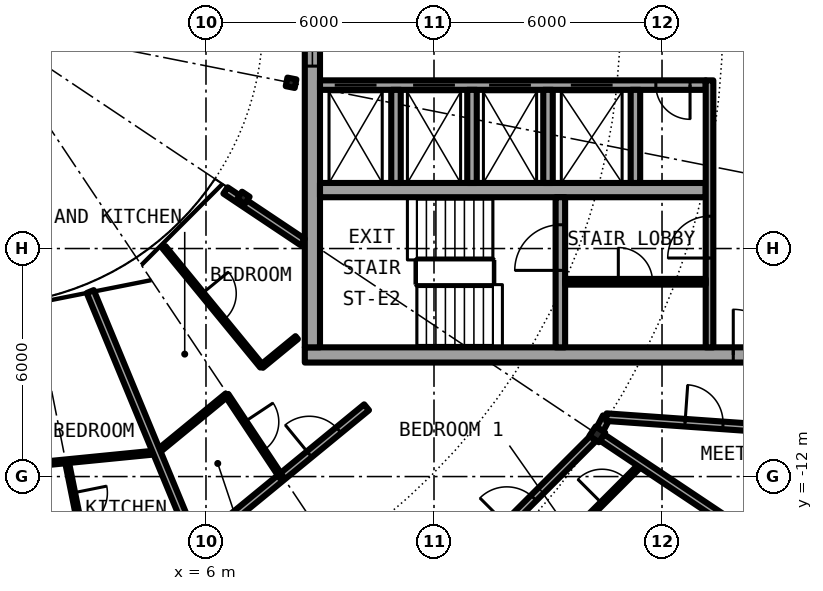
"""IFC4 building model, lengths in metres.
Left out: names, types, materials, properties, quantities, classifications, styles, units other than length and angle.
Written with IfcOpenShell. Run it as: python <this file> out.ifc"""

import sys

from ifc_helpers import new_model, si_unit, direction, frame, frame_2d, origin, origin_2d, place, context, subcontext, project, spatial, rectangle, i_section, extrude, element, fill, save


model = new_model("IFC4")
c1 = context("Model", 3, precision=1e-05, world=origin(), true_north=direction((0.0, 1.0)))
c2 = subcontext(c1, "Body", "Model", "MODEL_VIEW")
j1 = project(units=[si_unit("LENGTHUNIT", "METRE"), si_unit("PLANEANGLEUNIT", "RADIAN")], contexts=[c1])
p1 = place(None, origin())
s1 = spatial("IfcSite", under=j1, at=p1, CompositionType="ELEMENT")
p2 = place(p1, origin())
s2 = spatial("IfcBuilding", under=s1, at=p2, CompositionType="ELEMENT")
p3 = place(p2, frame((0.0, 0.0, 243.2)))
s3 = spatial("IfcBuildingStorey", under=s2, at=p3, CompositionType="ELEMENT", Elevation=243.2)
p4 = place(p3, frame((16.297, -10.889, 0.0), z_axis=(0.0, 0.0, 1.0), x_axis=(0.831469612303, -0.55557023302, 0.0)))
e1 = element("IfcColumn", 1, at=p4, inside=s3, PredefinedType="COLUMN", context=c2, shape_type="SweptSolid", body=[
    extrude(i_section(OverallWidth=0.3, OverallDepth=0.3, WebThickness=0.011, FlangeThickness=0.019, FilletRadius=0.027, at=origin_2d()), origin(), (0.0, 0.0, 1.0), 3.05),
])
for number, where, z_axis, x_axis in (
    (2, (6.984, -4.667, 0.0), (0.0, 0.0, 1.0), (0.831, -0.556, 0.0)),
    (3, (8.239, -1.639, 0.0), (0.0, 0.0, 1.0), (0.981, -0.195, 0.0)),
):
    element("IfcColumn", number, at=place(p3, frame(where, z_axis=z_axis, x_axis=x_axis)), inside=s3, PredefinedType="COLUMN", context=c2, shape_type="SweptSolid", body=[
        extrude(i_section(OverallWidth=0.24, OverallDepth=0.23, WebThickness=0.008, FlangeThickness=0.012, FilletRadius=0.021, at=origin_2d()), origin(), (0.0, 0.0, 1.0), 3.05),
    ])
p5 = place(p3, frame((8.6, -8.8, 0.0), z_axis=(0.0, 0.0, 1.0), x_axis=(1.0, 0.0, 0.0)))
e4 = element("IfcWall", 4, at=p5, inside=s3, PredefinedType="SHEAR", context=c2, shape_type="SweptSolid", body=[
    extrude(rectangle(XDim=13.4, YDim=0.4, at=frame_2d((6.7, 0.0))), origin(), (0.0, 0.0, 1.0), 3.05),
])
p6 = place(p5, frame((11.275, 0.0, 0.0)))
e5 = element("IfcOpeningElement", 5, at=p6, cuts=e4, PredefinedType="OPENING", context=c2, shape_type="SweptSolid", body=[
    extrude(rectangle(XDim=1.2, YDim=2.3, at=frame_2d((0.6, 1.15))), frame((0.0, 0.21, 0.0), z_axis=(0.0, -1.0, 0.0), x_axis=(1.0, 0.0, 0.0)), (0.0, 0.0, 1.0), 0.42),
])
p7 = place(p3, frame((8.8, -8.6, 0.0), z_axis=(0.0, 0.0, 1.0), x_axis=(0.0, 1.0, 0.0)))
e6 = element("IfcWall", 6, at=p7, inside=s3, PredefinedType="SHEAR", context=c2, shape_type="SweptSolid", body=[
    extrude(rectangle(XDim=17.2, YDim=0.4, at=frame_2d((8.6, 0.0))), origin(), (0.0, 0.0, 1.0), 3.05),
])
p8 = place(p7, frame((7.4, 0.0, 0.1)))
e7 = element("IfcOpeningElement", 7, at=p8, cuts=e6, PredefinedType="OPENING", context=c2, shape_type="SweptSolid", body=[
    extrude(rectangle(XDim=2.4, YDim=2.2, at=frame_2d((1.2, 1.1))), frame((0.0, 0.21, 0.0), z_axis=(0.0, -1.0, 0.0), x_axis=(1.0, 0.0, 0.0)), (0.0, 0.0, 1.0), 0.42),
])
p9 = place(p3, frame((19.15, -1.7, 0.0), z_axis=(0.0, 0.0, 1.0), x_axis=(-1.0, 0.0, 0.0)))
e8 = element("IfcWall", 8, at=p9, inside=s3, PredefinedType="SHEAR", context=c2, shape_type="SweptSolid", body=[
    extrude(rectangle(XDim=10.15, YDim=0.25, at=frame_2d((5.075, 0.0))), origin(), (0.0, 0.0, 1.0), 3.05),
])
p10 = place(p9, frame((8.663, 0.0, 0.0)))
e9 = element("IfcOpeningElement", 9, at=p10, cuts=e8, PredefinedType="OPENING", context=c2, shape_type="SweptSolid", body=[
    extrude(rectangle(XDim=1.1, YDim=2.3, at=frame_2d((0.55, 1.15))), frame((0.0, 0.135, 0.0), z_axis=(0.0, -1.0, 0.0), x_axis=(1.0, 0.0, 0.0)), (0.0, 0.0, 1.0), 0.27),
])
p11 = place(p9, frame((6.6, 0.0, 0.0)))
e10 = element("IfcOpeningElement", 10, at=p11, cuts=e8, PredefinedType="OPENING", context=c2, shape_type="SweptSolid", body=[
    extrude(rectangle(XDim=1.1, YDim=2.3, at=frame_2d((0.55, 1.15))), frame((0.0, 0.135, 0.0), z_axis=(0.0, -1.0, 0.0), x_axis=(1.0, 0.0, 0.0)), (0.0, 0.0, 1.0), 0.27),
])
p12 = place(p9, frame((4.6, 0.0, 0.0)))
e11 = element("IfcOpeningElement", 11, at=p12, cuts=e8, PredefinedType="OPENING", context=c2, shape_type="SweptSolid", body=[
    extrude(rectangle(XDim=1.1, YDim=2.3, at=frame_2d((0.55, 1.15))), frame((0.0, 0.135, 0.0), z_axis=(0.0, -1.0, 0.0), x_axis=(1.0, 0.0, 0.0)), (0.0, 0.0, 1.0), 0.27),
])
p13 = place(p9, frame((2.45, 0.0, 0.0)))
e12 = element("IfcOpeningElement", 12, at=p13, cuts=e8, PredefinedType="OPENING", context=c2, shape_type="SweptSolid", body=[
    extrude(rectangle(XDim=1.1, YDim=2.3, at=frame_2d((0.55, 1.15))), frame((0.0, 0.135, 0.0), z_axis=(0.0, -1.0, 0.0), x_axis=(1.0, 0.0, 0.0)), (0.0, 0.0, 1.0), 0.27),
])
p14 = place(p9, frame((0.413, 0.0, 0.0)))
e13 = element("IfcOpeningElement", 13, at=p14, cuts=e8, PredefinedType="OPENING", context=c2, shape_type="SweptSolid", body=[
    extrude(rectangle(XDim=0.9, YDim=2.3, at=frame_2d((0.45, 1.15))), frame((0.0, 0.135, 0.0), z_axis=(0.0, -1.0, 0.0), x_axis=(1.0, 0.0, 0.0)), (0.0, 0.0, 1.0), 0.27),
])
p15 = place(p3, frame((9.0, -4.462, 0.0), z_axis=(0.0, 0.0, 1.0), x_axis=(1.0, 0.0, 0.0)))
e14 = element("IfcWall", 14, at=p15, inside=s3, PredefinedType="SHEAR", context=c2, shape_type="SweptSolid", body=[
    extrude(rectangle(XDim=10.15, YDim=0.375, at=frame_2d((5.075, 0.0))), origin(), (0.0, 0.0, 1.0), 3.05),
])
p16 = place(p3, frame((15.325, -8.6, 0.0), z_axis=(0.0, 0.0, 1.0), x_axis=(0.0, 1.0, 0.0)))
e15 = element("IfcWall", 15, at=p16, inside=s3, PredefinedType="SHEAR", context=c2, shape_type="SweptSolid", body=[
    extrude(rectangle(XDim=3.95, YDim=0.25, at=frame_2d((1.975, 0.0))), origin(), (0.0, 0.0, 1.0), 3.05),
])
p17 = place(p16, frame((2.025, 0.0, 0.0)))
e16 = element("IfcOpeningElement", 16, at=p17, cuts=e15, PredefinedType="OPENING", context=c2, shape_type="SweptSolid", body=[
    extrude(rectangle(XDim=1.2, YDim=2.3, at=frame_2d((0.6, 1.15))), frame((0.0, 0.135, 0.0), z_axis=(0.0, -1.0, 0.0), x_axis=(1.0, 0.0, 0.0)), (0.0, 0.0, 1.0), 0.27),
])
for number, where, z_axis, x_axis in (
    (17, (15.0, -1.825, 0.0), (0.0, 0.0, 1.0), (0.0, -1.0, 0.0)),
    (18, (17.3, -1.825, 0.0), (0.0, 0.0, 1.0), (0.0, -1.0, 0.0)),
):
    element("IfcWall", number, at=place(p3, frame(where, z_axis=z_axis, x_axis=x_axis)), inside=s3, PredefinedType="SOLIDWALL", context=c2, shape_type="SweptSolid", body=[
        extrude(rectangle(XDim=2.45, YDim=0.25, at=frame_2d((1.225, 0.0))), origin(), (0.0, 0.0, 1.0), 2.7),
    ])
p18 = place(p3, frame((19.25, -8.6, 0.0), z_axis=(0.0, 0.0, 1.0), x_axis=(0.0, 1.0, 0.0)))
e19 = element("IfcWall", 19, at=p18, inside=s3, PredefinedType="SOLIDWALL", context=c2, shape_type="SweptSolid", body=[
    extrude(rectangle(XDim=7.025, YDim=0.2, at=frame_2d((3.513, 0.0))), origin(), (0.0, 0.0, 1.0), 2.7),
])
p19 = place(p18, frame((2.35, 0.0, 0.0)))
e20 = element("IfcOpeningElement", 20, at=p19, cuts=e19, PredefinedType="OPENING", context=c2, shape_type="SweptSolid", body=[
    extrude(rectangle(XDim=1.1, YDim=2.3, at=frame_2d((0.55, 1.15))), frame((0.0, 0.11, 0.0), z_axis=(0.0, -1.0, 0.0), x_axis=(1.0, 0.0, 0.0)), (0.0, 0.0, 1.0), 0.22),
])
for number, where, z_axis, x_axis in (
    (21, (11.0, -1.825, 0.0), (0.0, 0.0, 1.0), (0.0, -1.0, 0.0)),
    (22, (13.0, -1.825, 0.0), (0.0, 0.0, 1.0), (0.0, -1.0, 0.0)),
):
    element("IfcWall", number, at=place(p3, frame(where, z_axis=z_axis, x_axis=x_axis)), inside=s3, PredefinedType="SOLIDWALL", context=c2, shape_type="SweptSolid", body=[
        extrude(rectangle(XDim=2.45, YDim=0.25, at=frame_2d((1.225, 0.0))), origin(), (0.0, 0.0, 1.0), 2.7),
    ])
p20 = place(p3, frame((15.45, -6.875, 0.0), z_axis=(0.0, 0.0, 1.0), x_axis=(1.0, 0.0, 0.0)))
e23 = element("IfcWall", 23, at=p20, inside=s3, PredefinedType="PARTITIONING", context=c2, shape_type="SweptSolid", body=[
    extrude(rectangle(XDim=3.7, YDim=0.15, at=frame_2d((1.85, 0.0))), origin(), (0.0, 0.0, 1.0), 2.7),
])
p21 = place(p20, frame((1.4, 0.0, 0.0)))
e24 = element("IfcOpeningElement", 24, at=p21, cuts=e23, PredefinedType="OPENING", context=c2, shape_type="SweptSolid", body=[
    extrude(rectangle(XDim=0.9, YDim=2.3, at=frame_2d((0.45, 1.15))), frame((0.0, 0.085, 0.0), z_axis=(0.0, -1.0, 0.0), x_axis=(1.0, 0.0, 0.0)), (0.0, 0.0, 1.0), 0.17),
])
p22 = place(p3, frame((14.559, -14.569, 0.0), z_axis=(0.0, 0.0, 1.0), x_axis=(0.707106781187, 0.707106781187, 0.0)))
e25 = element("IfcWall", 25, at=p22, inside=s3, PredefinedType="PARTITIONING", context=c2, shape_type="SweptSolid", body=[
    extrude(rectangle(XDim=4.111, YDim=0.1, at=frame_2d((2.056, 0.0))), origin(), (0.0, 0.0, 1.0), 2.7),
])
p23 = place(p22, frame((2.633, 0.0, 0.0)))
e26 = element("IfcOpeningElement", 26, at=p23, cuts=e25, PredefinedType="OPENING", context=c2, shape_type="SweptSolid", body=[
    extrude(rectangle(XDim=0.9, YDim=2.3, at=frame_2d((0.45, 1.15))), frame((0.0, 0.06, 0.0), z_axis=(0.0, -1.0, 0.0), x_axis=(1.0, 0.0, 0.0)), (0.0, 0.0, 1.0), 0.12),
])
p24 = place(p3, frame((16.367, -10.756, 0.0), z_axis=(0.0, 0.0, 1.0), x_axis=(0.465802239822, 0.884888848035, 0.0)))
e27 = element("IfcWall", 27, at=p24, inside=s3, PredefinedType="PARTITIONING", context=c2, shape_type="SweptSolid", body=[
    extrude(rectangle(XDim=0.361, YDim=0.2, at=frame_2d((0.18, 0.0))), origin(), (0.0, 0.0, 1.0), 2.7),
])
p25 = place(p3, frame((10.997, -16.189, 0.0), z_axis=(0.0, 0.0, 1.0), x_axis=(0.707106781187, 0.707106781187, 0.0)))
e28 = element("IfcWall", 28, at=p25, inside=s3, PredefinedType="PARTITIONING", context=c2, shape_type="SweptSolid", body=[
    extrude(rectangle(XDim=7.343, YDim=0.2, at=frame_2d((3.671, 0.0))), origin(), (0.0, 0.0, 1.0), 2.45),
])
p26 = place(p25, frame((4.127, 0.0, 0.0)))
e29 = element("IfcOpeningElement", 29, at=p26, cuts=e28, PredefinedType="OPENING", context=c2, shape_type="SweptSolid", body=[
    extrude(rectangle(XDim=1.0, YDim=2.3, at=frame_2d((0.5, 1.15))), frame((0.0, 0.11, 0.0), z_axis=(0.0, -1.0, 0.0), x_axis=(1.0, 0.0, 0.0)), (0.0, 0.0, 1.0), 0.22),
])
p27 = place(p3, frame((5.74, -13.858, 0.0), z_axis=(0.0, 0.0, 1.0), x_axis=(0.773071783484, 0.634318545828, 0.0)))
e30 = element("IfcWall", 30, at=p27, inside=s3, PredefinedType="PARTITIONING", context=c2, shape_type="SweptSolid", body=[
    extrude(rectangle(XDim=5.803, YDim=0.2, at=frame_2d((2.901, 0.0))), origin(), (0.0, 0.0, 1.0), 2.7),
])
p28 = place(p27, frame((3.854, 0.0, 0.0)))
e31 = element("IfcOpeningElement", 31, at=p28, cuts=e30, PredefinedType="OPENING", context=c2, shape_type="SweptSolid", body=[
    extrude(rectangle(XDim=1.0, YDim=2.3, at=frame_2d((0.5, 1.15))), frame((0.0, 0.11, 0.0), z_axis=(0.0, -1.0, 0.0), x_axis=(1.0, 0.0, 0.0)), (0.0, 0.0, 1.0), 0.22),
])
p29 = place(p3, frame((1.154, -11.714, 0.0), z_axis=(0.0, 0.0, 1.0), x_axis=(0.995140096511, 0.098469225223, 0.0)))
e32 = element("IfcWall", 32, at=p29, inside=s3, PredefinedType="PARTITIONING", context=c2, shape_type="SweptSolid", body=[
    extrude(rectangle(XDim=3.575, YDim=0.1, at=frame_2d((1.788, 0.0))), origin(), (0.0, 0.0, 1.0), 2.7),
])
p30 = place(p3, frame((4.707, -11.364, 0.0), z_axis=(0.0, 0.0, 1.0), x_axis=(0.773033390712, 0.634365333893, 0.0)))
e33 = element("IfcWall", 33, at=p30, inside=s3, PredefinedType="PARTITIONING", context=c2, shape_type="SweptSolid", body=[
    extrude(rectangle(XDim=2.38, YDim=0.1, at=frame_2d((1.19, 0.0))), origin(), (0.0, 0.0, 1.0), 2.7),
])
p31 = place(p3, frame((7.466, -9.1, 0.0), z_axis=(0.0, 0.0, 1.0), x_axis=(0.772869802794, 0.634564628646, 0.0)))
e34 = element("IfcWall", 34, at=p31, inside=s3, PredefinedType="PARTITIONING", context=c2, shape_type="SweptSolid", body=[
    extrude(rectangle(XDim=1.192, YDim=0.1, at=frame_2d((0.596, 0.0))), origin(), (0.0, 0.0, 1.0), 2.7),
])
p32 = place(p3, frame((16.535, -10.437, 0.0), z_axis=(0.0, 0.0, 1.0), x_axis=(0.997515141784, -0.070452408845, 0.0)))
e35 = element("IfcWall", 35, at=p32, inside=s3, PredefinedType="PARTITIONING", context=c2, shape_type="SweptSolid", body=[
    extrude(rectangle(XDim=5.153, YDim=0.2, at=frame_2d((2.576, 0.0))), origin(), (0.0, 0.0, 1.0), 2.7),
])
p33 = place(p32, frame((2.076, 0.0, 0.0)))
e36 = element("IfcOpeningElement", 36, at=p33, cuts=e35, PredefinedType="OPENING", context=c2, shape_type="SweptSolid", body=[
    extrude(rectangle(XDim=1.0, YDim=2.3, at=frame_2d((0.5, 1.15))), frame((0.0, 0.11, 0.0), z_axis=(0.0, -1.0, 0.0), x_axis=(1.0, 0.0, 0.0)), (0.0, 0.0, 1.0), 0.22),
])
p34 = place(p3, frame((6.513, -4.472, 0.0), z_axis=(0.0, 0.0, 1.0), x_axis=(0.831450132577, -0.555599385382, 0.0)))
e37 = element("IfcWall", 37, at=p34, inside=s3, PredefinedType="PARTITIONING", context=c2, shape_type="SweptSolid", body=[
    extrude(rectangle(XDim=2.443, YDim=0.2, at=frame_2d((1.221, 0.0))), origin(), (0.0, 0.0, 1.0), 2.7),
])
p35 = place(p3, frame((2.338, -11.597, 0.0), z_axis=(0.0, 0.0, 1.0), x_axis=(0.197580088655, -0.980286748134, 0.0)))
e38 = element("IfcWall", 38, at=p35, inside=s3, PredefinedType="PARTITIONING", context=c2, shape_type="SweptSolid", body=[
    extrude(rectangle(XDim=2.597, YDim=0.1, at=frame_2d((1.299, 0.0))), origin(), (0.0, 0.0, 1.0), 2.7),
])
p36 = place(p35, frame((0.849, 0.0, 0.0)))
e39 = element("IfcOpeningElement", 39, at=p36, cuts=e38, PredefinedType="OPENING", context=c2, shape_type="SweptSolid", body=[
    extrude(rectangle(XDim=0.9, YDim=2.3, at=frame_2d((0.45, 1.15))), frame((0.0, 0.06, 0.0), z_axis=(0.0, -1.0, 0.0), x_axis=(1.0, 0.0, 0.0)), (0.0, 0.0, 1.0), 0.12),
])
p37 = place(p3, frame((2.954, -7.132, 0.0), z_axis=(0.0, 0.0, 1.0), x_axis=(0.38267858248, -0.923881541385, 0.0)))
e40 = element("IfcWall", 40, at=p37, inside=s3, PredefinedType="PARTITIONING", context=c2, shape_type="SweptSolid", body=[
    extrude(rectangle(XDim=7.28, YDim=0.2, at=frame_2d((3.64, 0.0))), origin(), (0.0, 0.0, 1.0), 2.7),
])
p38 = place(p3, frame((4.897, -5.969, 0.0), z_axis=(0.0, 0.0, 1.0), x_axis=(0.634313840507, -0.773075644256, 0.0)))
e41 = element("IfcWall", 41, at=p38, inside=s3, PredefinedType="PARTITIONING", context=c2, shape_type="SweptSolid", body=[
    extrude(rectangle(XDim=4.05, YDim=0.1, at=frame_2d((2.025, 0.0))), origin(), (0.0, 0.0, 1.0), 2.7),
])
p39 = place(p38, frame((1.575, 0.0, 0.0)))
e42 = element("IfcOpeningElement", 42, at=p39, cuts=e41, PredefinedType="OPENING", context=c2, shape_type="SweptSolid", body=[
    extrude(rectangle(XDim=0.9, YDim=2.3, at=frame_2d((0.45, 1.15))), frame((0.0, 0.06, 0.0), z_axis=(0.0, -1.0, 0.0), x_axis=(1.0, 0.0, 0.0)), (0.0, 0.0, 1.0), 0.12),
])
p40 = place(p3, frame((6.546, -9.854, 0.0), z_axis=(0.0, 0.0, 1.0), x_axis=(0.553354377247, -0.83294593653, 0.0)))
e43 = element("IfcWall", 43, at=p40, inside=s3, PredefinedType="PARTITIONING", context=c2, shape_type="SweptSolid", body=[
    extrude(rectangle(XDim=2.597, YDim=0.1, at=frame_2d((1.298, 0.0))), origin(), (0.0, 0.0, 1.0), 2.7),
])
p41 = place(p40, frame((0.849, 0.0, 0.0)))
e44 = element("IfcOpeningElement", 44, at=p41, cuts=e43, PredefinedType="OPENING", context=c2, shape_type="SweptSolid", body=[
    extrude(rectangle(XDim=0.9, YDim=2.3, at=frame_2d((0.45, 1.15))), frame((0.0, 0.06, 0.0), z_axis=(0.0, -1.0, 0.0), x_axis=(1.0, 0.0, 0.0)), (0.0, 0.0, 1.0), 0.12),
])
p42 = place(p3, frame((16.422, -10.972, 0.0), z_axis=(0.0, 0.0, 1.0), x_axis=(0.831400632185, -0.55567345519, 0.0)))
e45 = element("IfcWall", 45, at=p42, inside=s3, PredefinedType="PARTITIONING", context=c2, shape_type="SweptSolid", body=[
    extrude(rectangle(XDim=4.108, YDim=0.2, at=frame_2d((2.054, 0.0))), origin(), (0.0, 0.0, 1.0), 2.7),
])
p43 = place(p10, origin())
e46 = element("IfcDoor", 46, at=p43, inside=s3, OperationType="DOUBLE_DOOR_SLIDING", PredefinedType="DOOR", context=c2, shape_type="SweptSolid", body=[
    extrude(rectangle(XDim=1.1, YDim=2.3, at=frame_2d((0.55, 1.15))), frame((0.0, 0.025, 0.0), z_axis=(0.0, -1.0, 0.0), x_axis=(1.0, 0.0, 0.0)), (0.0, 0.0, 1.0), 0.05),
])
fill(e9, e46)
p44 = place(p11, origin())
e47 = element("IfcDoor", 47, at=p44, inside=s3, OperationType="DOUBLE_DOOR_SLIDING", PredefinedType="DOOR", context=c2, shape_type="SweptSolid", body=[
    extrude(rectangle(XDim=1.1, YDim=2.3, at=frame_2d((0.55, 1.15))), frame((0.0, 0.025, 0.0), z_axis=(0.0, -1.0, 0.0), x_axis=(1.0, 0.0, 0.0)), (0.0, 0.0, 1.0), 0.05),
])
fill(e10, e47)
p45 = place(p12, origin())
e48 = element("IfcDoor", 48, at=p45, inside=s3, OperationType="DOUBLE_DOOR_SLIDING", PredefinedType="DOOR", context=c2, shape_type="SweptSolid", body=[
    extrude(rectangle(XDim=1.1, YDim=2.3, at=frame_2d((0.55, 1.15))), frame((0.0, 0.025, 0.0), z_axis=(0.0, -1.0, 0.0), x_axis=(1.0, 0.0, 0.0)), (0.0, 0.0, 1.0), 0.05),
])
fill(e11, e48)
p46 = place(p13, origin())
e49 = element("IfcDoor", 49, at=p46, inside=s3, OperationType="DOUBLE_DOOR_SLIDING", PredefinedType="DOOR", context=c2, shape_type="SweptSolid", body=[
    extrude(rectangle(XDim=1.1, YDim=2.3, at=frame_2d((0.55, 1.15))), frame((0.0, 0.025, 0.0), z_axis=(0.0, -1.0, 0.0), x_axis=(1.0, 0.0, 0.0)), (0.0, 0.0, 1.0), 0.05),
])
fill(e12, e49)
p47 = place(p14, origin())
e50 = element("IfcDoor", 50, at=p47, inside=s3, OperationType="SINGLE_SWING_RIGHT", PredefinedType="DOOR", context=c2, shape_type="SweptSolid", body=[
    extrude(rectangle(XDim=0.9, YDim=2.3, at=frame_2d((0.45, 1.15))), frame((0.0, 0.025, 0.0), z_axis=(0.0, -1.0, 0.0), x_axis=(1.0, 0.0, 0.0)), (0.0, 0.0, 1.0), 0.05),
])
fill(e13, e50)
p48 = place(p21, origin())
e51 = element("IfcDoor", 51, at=p48, inside=s3, OperationType="SINGLE_SWING_LEFT", PredefinedType="DOOR", context=c2, shape_type="SweptSolid", body=[
    extrude(rectangle(XDim=0.9, YDim=2.3, at=frame_2d((0.45, 1.15))), frame((0.0, 0.025, 0.0), z_axis=(0.0, -1.0, 0.0), x_axis=(1.0, 0.0, 0.0)), (0.0, 0.0, 1.0), 0.05),
])
fill(e24, e51)
p49 = place(p17, origin())
e52 = element("IfcDoor", 52, at=p49, inside=s3, OperationType="SINGLE_SWING_LEFT", PredefinedType="DOOR", context=c2, shape_type="SweptSolid", body=[
    extrude(rectangle(XDim=1.2, YDim=2.3, at=frame_2d((0.6, 1.15))), frame((0.0, 0.025, 0.0), z_axis=(0.0, -1.0, 0.0), x_axis=(1.0, 0.0, 0.0)), (0.0, 0.0, 1.0), 0.05),
])
fill(e16, e52)
p50 = place(p19, origin())
e53 = element("IfcDoor", 53, at=p50, inside=s3, OperationType="SINGLE_SWING_RIGHT", PredefinedType="DOOR", context=c2, shape_type="SweptSolid", body=[
    extrude(rectangle(XDim=1.1, YDim=2.3, at=frame_2d((0.55, 1.15))), frame((0.0, 0.025, 0.0), z_axis=(0.0, -1.0, 0.0), x_axis=(1.0, 0.0, 0.0)), (0.0, 0.0, 1.0), 0.05),
])
fill(e20, e53)
p51 = place(p6, origin())
e54 = element("IfcDoor", 54, at=p51, inside=s3, OperationType="SINGLE_SWING_LEFT", PredefinedType="DOOR", context=c2, shape_type="SweptSolid", body=[
    extrude(rectangle(XDim=1.2, YDim=2.3, at=frame_2d((0.6, 1.15))), frame((0.0, 0.025, 0.0), z_axis=(0.0, -1.0, 0.0), x_axis=(1.0, 0.0, 0.0)), (0.0, 0.0, 1.0), 0.05),
])
fill(e5, e54)
p52 = place(p8, origin())
e55 = element("IfcWindow", 55, at=p52, inside=s3, PartitioningType="SINGLE_PANEL", PredefinedType="WINDOW", context=c2, shape_type="SweptSolid", body=[
    extrude(rectangle(XDim=2.4, YDim=2.2, at=frame_2d((1.2, 1.1))), frame((0.0, 0.03, 0.0), z_axis=(0.0, -1.0, 0.0), x_axis=(1.0, 0.0, 0.0)), (0.0, 0.0, 1.0), 0.06),
])
fill(e7, e55)
p53 = place(p26, origin())
e56 = element("IfcDoor", 56, at=p53, inside=s3, OperationType="SINGLE_SWING_RIGHT", PredefinedType="DOOR", context=c2, shape_type="SweptSolid", body=[
    extrude(rectangle(XDim=1.0, YDim=2.3, at=frame_2d((0.5, 1.15))), frame((0.0, 0.025, 0.0), z_axis=(0.0, -1.0, 0.0), x_axis=(1.0, 0.0, 0.0)), (0.0, 0.0, 1.0), 0.05),
])
fill(e29, e56)
p54 = place(p23, origin())
e57 = element("IfcDoor", 57, at=p54, inside=s3, OperationType="SINGLE_SWING_RIGHT", PredefinedType="DOOR", context=c2, shape_type="SweptSolid", body=[
    extrude(rectangle(XDim=0.9, YDim=2.3, at=frame_2d((0.45, 1.15))), frame((0.0, 0.025, 0.0), z_axis=(0.0, -1.0, 0.0), x_axis=(1.0, 0.0, 0.0)), (0.0, 0.0, 1.0), 0.05),
])
fill(e26, e57)
p55 = place(p36, origin())
e58 = element("IfcDoor", 58, at=p55, inside=s3, OperationType="SINGLE_SWING_LEFT", PredefinedType="DOOR", context=c2, shape_type="SweptSolid", body=[
    extrude(rectangle(XDim=0.9, YDim=2.3, at=frame_2d((0.45, 1.15))), frame((0.0, 0.025, 0.0), z_axis=(0.0, -1.0, 0.0), x_axis=(1.0, 0.0, 0.0)), (0.0, 0.0, 1.0), 0.05),
])
fill(e39, e58)
p56 = place(p28, origin())
e59 = element("IfcDoor", 59, at=p56, inside=s3, OperationType="SINGLE_SWING_RIGHT", PredefinedType="DOOR", context=c2, shape_type="SweptSolid", body=[
    extrude(rectangle(XDim=1.0, YDim=2.3, at=frame_2d((0.5, 1.15))), frame((0.0, 0.025, 0.0), z_axis=(0.0, -1.0, 0.0), x_axis=(1.0, 0.0, 0.0)), (0.0, 0.0, 1.0), 0.05),
])
fill(e31, e59)
p57 = place(p41, origin())
e60 = element("IfcDoor", 60, at=p57, inside=s3, OperationType="SINGLE_SWING_RIGHT", PredefinedType="DOOR", context=c2, shape_type="SweptSolid", body=[
    extrude(rectangle(XDim=0.9, YDim=2.3, at=frame_2d((0.45, 1.15))), frame((0.0, 0.025, 0.0), z_axis=(0.0, -1.0, 0.0), x_axis=(1.0, 0.0, 0.0)), (0.0, 0.0, 1.0), 0.05),
])
fill(e44, e60)
p58 = place(p39, origin())
e61 = element("IfcDoor", 61, at=p58, inside=s3, OperationType="SINGLE_SWING_LEFT", PredefinedType="DOOR", context=c2, shape_type="SweptSolid", body=[
    extrude(rectangle(XDim=0.9, YDim=2.3, at=frame_2d((0.45, 1.15))), frame((0.0, 0.025, 0.0), z_axis=(0.0, -1.0, 0.0), x_axis=(1.0, 0.0, 0.0)), (0.0, 0.0, 1.0), 0.05),
])
fill(e42, e61)
p59 = place(p33, origin())
e62 = element("IfcDoor", 62, at=p59, inside=s3, OperationType="SINGLE_SWING_LEFT", PredefinedType="DOOR", context=c2, shape_type="SweptSolid", body=[
    extrude(rectangle(XDim=1.0, YDim=2.3, at=frame_2d((0.5, 1.15))), frame((0.0, 0.025, 0.0), z_axis=(0.0, -1.0, 0.0), x_axis=(1.0, 0.0, 0.0)), (0.0, 0.0, 1.0), 0.05),
])
fill(e36, e62)
save(model, sys.argv[1])
